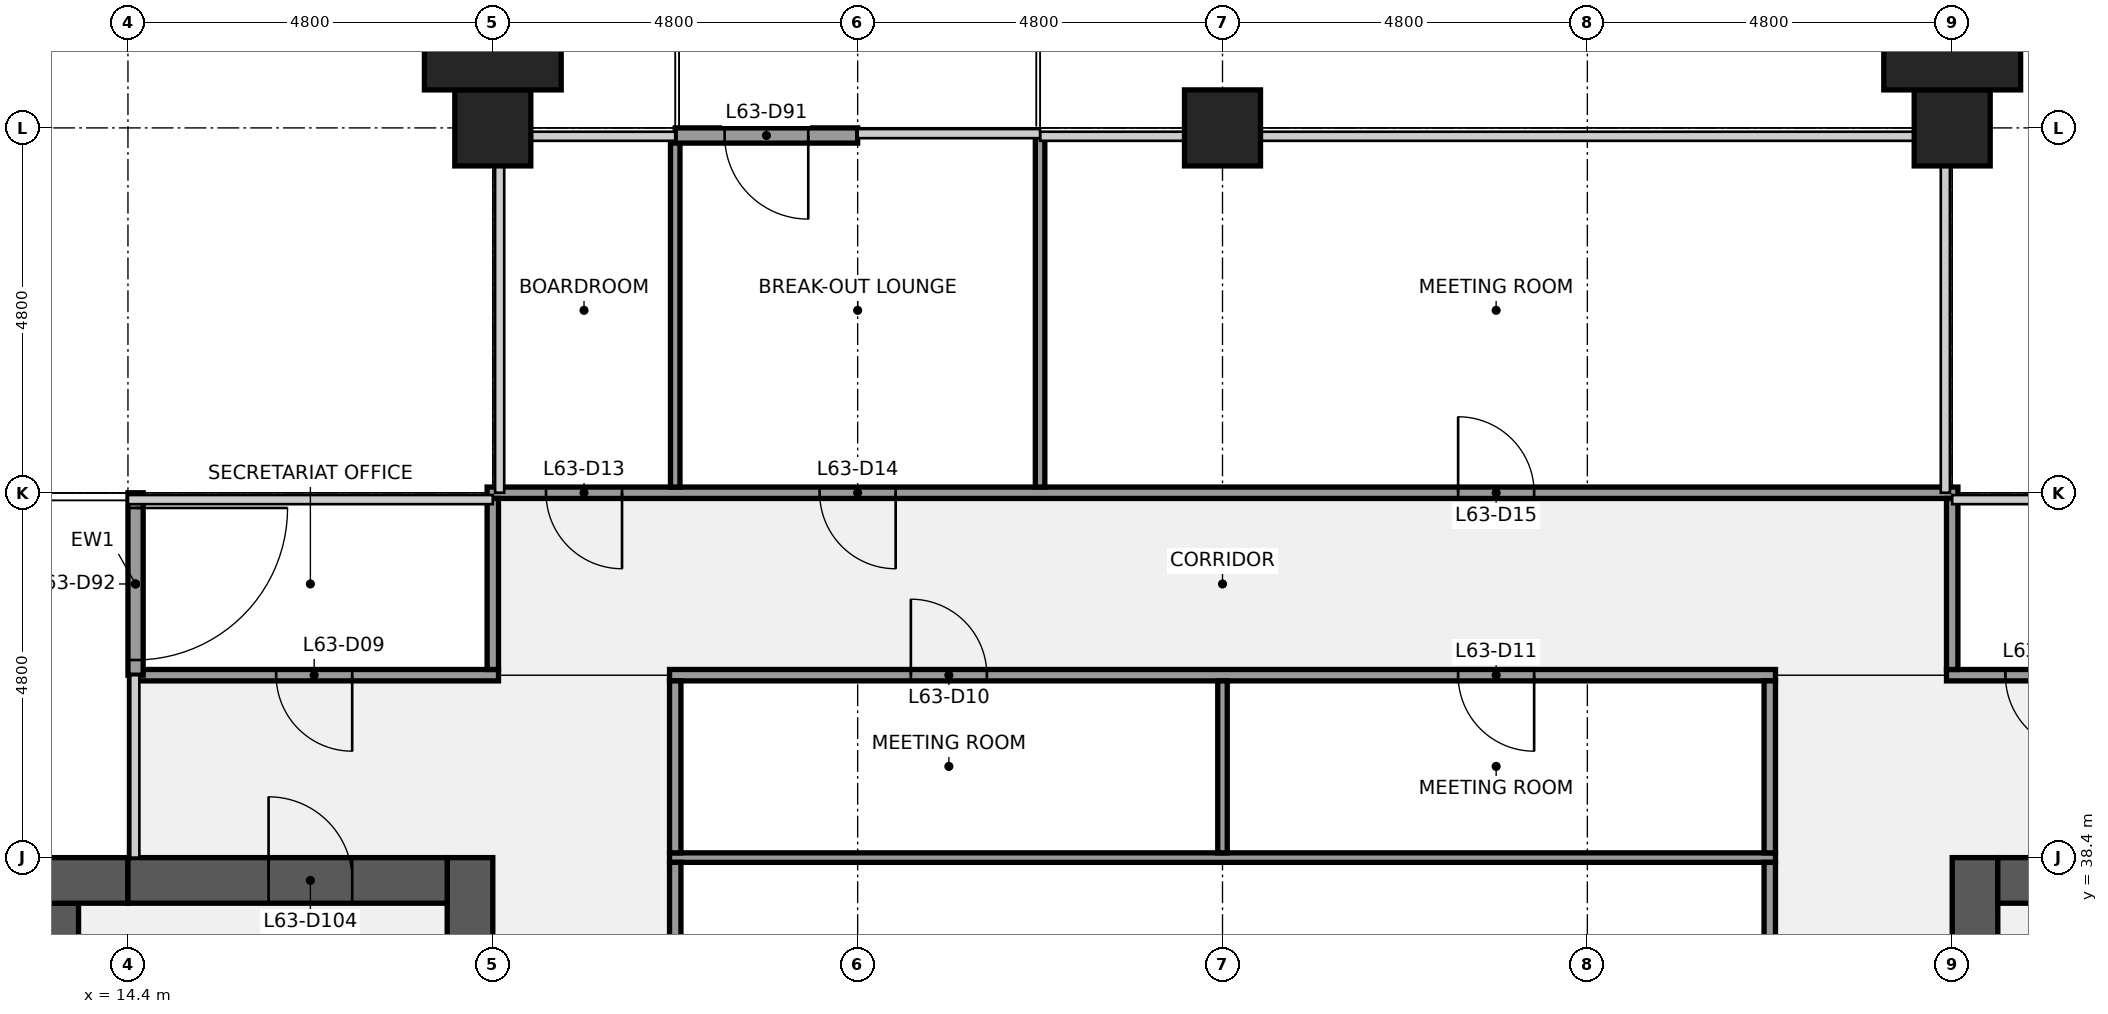
"""IFC4 building model, lengths in metres.
Left out: names, types, materials, properties, quantities, classifications, styles, units other than length and angle.
Written with IfcOpenShell. Run it as: python <this file> out.ifc"""

import sys

from ifc_helpers import new_model, si_unit, direction, frame, frame_2d, origin, origin_2d, place, context, subcontext, project, spatial, rectangle, extrude, element, fill, save


model = new_model("IFC4")
c1 = context("Model", 3, precision=1e-05, world=origin(), true_north=direction((0.0, 1.0)))
c2 = subcontext(c1, "Body", "Model", "MODEL_VIEW")
j1 = project(units=[si_unit("LENGTHUNIT", "METRE"), si_unit("PLANEANGLEUNIT", "RADIAN")], contexts=[c1])
p1 = place(None, origin())
s1 = spatial("IfcSite", under=j1, at=p1, CompositionType="ELEMENT")
p2 = place(p1, origin())
s2 = spatial("IfcBuilding", under=s1, at=p2, CompositionType="ELEMENT")
p3 = place(p2, frame((0.0, 0.0, 290.3)))
s3 = spatial("IfcBuildingStorey", under=s2, at=p3, CompositionType="ELEMENT", Elevation=290.3)
for number, where, z_axis, x_axis in (
    (1, (19.2, 48.0, 0.0), (0.0, 0.0, 1.0), (1.0, 0.0, 0.0)),
    (2, (28.8, 48.0, 0.0), (0.0, 0.0, 1.0), (1.0, 0.0, 0.0)),
    (3, (38.4, 48.0, 0.0), (0.0, 0.0, 1.0), (1.0, 0.0, 0.0)),
):
    element("IfcColumn", number, at=place(p3, frame(where, z_axis=z_axis, x_axis=x_axis)), inside=s3, PredefinedType="COLUMN", context=c2, shape_type="SweptSolid", body=[
        extrude(rectangle(XDim=1.0, YDim=1.0, at=origin_2d()), origin(), (0.0, 0.0, 1.0), 4.0),
    ])
p4 = place(p3, frame((18.9, 38.4, 0.0), z_axis=(0.0, 0.0, 1.0), x_axis=(0.0, -1.0, 0.0)))
e4 = element("IfcWall", 4, at=p4, inside=s3, PredefinedType="SHEAR", context=c2, shape_type="SweptSolid", body=[
    extrude(rectangle(XDim=28.8, YDim=0.6, at=frame_2d((14.4, 0.0))), origin(), (0.0, 0.0, 1.0), 3.84),
])
p5 = place(p4, frame((18.3, 0.0, 0.0)))
e5 = element("IfcOpeningElement", 5, at=p5, cuts=e4, PredefinedType="OPENING", context=c2, shape_type="SweptSolid", body=[
    extrude(rectangle(XDim=1.8, YDim=2.1, at=frame_2d((0.9, 1.05))), frame((0.0, 0.31, 0.0), z_axis=(0.0, -1.0, 0.0), x_axis=(1.0, 0.0, 0.0)), (0.0, 0.0, 1.0), 0.62),
])
p6 = place(p4, frame((8.7, 0.0, 0.0)))
e6 = element("IfcOpeningElement", 6, at=p6, cuts=e4, PredefinedType="OPENING", context=c2, shape_type="SweptSolid", body=[
    extrude(rectangle(XDim=1.8, YDim=2.1, at=frame_2d((0.9, 1.05))), frame((0.0, 0.31, 0.0), z_axis=(0.0, -1.0, 0.0), x_axis=(1.0, 0.0, 0.0)), (0.0, 0.0, 1.0), 0.62),
])
p7 = place(p3, frame((6.25, 37.5, 0.0), z_axis=(0.0, 0.0, 1.0), x_axis=(1.0, 0.0, 0.0)))
e7 = element("IfcWall", 7, at=p7, inside=s3, PredefinedType="SHEAR", context=c2, shape_type="SweptSolid", body=[
    extrude(rectangle(XDim=7.5, YDim=0.6, at=frame_2d((3.75, 0.0))), origin(), (0.0, 0.0, 1.0), 3.84),
])
p8 = place(p3, frame((0.6, 38.1, 0.0), z_axis=(0.0, 0.0, 1.0), x_axis=(1.0, 0.0, 0.0)))
e8 = element("IfcWall", 8, at=p8, inside=s3, PredefinedType="SHEAR", context=c2, shape_type="SweptSolid", body=[
    extrude(rectangle(XDim=13.8, YDim=0.6, at=frame_2d((6.9, 0.0))), origin(), (0.0, 0.0, 1.0), 3.84),
])
p9 = place(p8, frame((5.7, 0.0, 0.9)))
e9 = element("IfcOpeningElement", 9, at=p9, cuts=e8, PredefinedType="OPENING", context=c2, shape_type="SweptSolid", body=[
    extrude(rectangle(XDim=1.8, YDim=1.5, at=frame_2d((0.9, 0.75))), frame((0.0, 0.31, 0.0), z_axis=(0.0, -1.0, 0.0), x_axis=(1.0, 0.0, 0.0)), (0.0, 0.0, 1.0), 0.62),
])
p10 = place(p8, frame((10.5, 0.0, 0.9)))
e10 = element("IfcOpeningElement", 10, at=p10, cuts=e8, PredefinedType="OPENING", context=c2, shape_type="SweptSolid", body=[
    extrude(rectangle(XDim=1.8, YDim=1.5, at=frame_2d((0.9, 0.75))), frame((0.0, 0.31, 0.0), z_axis=(0.0, -1.0, 0.0), x_axis=(1.0, 0.0, 0.0)), (0.0, 0.0, 1.0), 0.62),
])
p11 = place(p3, frame((14.4, 38.1, 0.0), z_axis=(0.0, 0.0, 1.0), x_axis=(1.0, 0.0, 0.0)))
e11 = element("IfcWall", 11, at=p11, inside=s3, PredefinedType="SHEAR", context=c2, shape_type="SweptSolid", body=[
    extrude(rectangle(XDim=4.2, YDim=0.6, at=frame_2d((2.1, 0.0))), origin(), (0.0, 0.0, 1.0), 3.84),
])
p12 = place(p11, frame((1.85, 0.0, 0.0)))
e12 = element("IfcOpeningElement", 12, at=p12, cuts=e11, PredefinedType="OPENING", context=c2, shape_type="SweptSolid", body=[
    extrude(rectangle(XDim=1.1, YDim=2.1, at=frame_2d((0.55, 1.05))), frame((0.0, 0.31, 0.0), z_axis=(0.0, -1.0, 0.0), x_axis=(1.0, 0.0, 0.0)), (0.0, 0.0, 1.0), 0.62),
])
p13 = place(p3, frame((38.7, 9.6, 0.0), z_axis=(0.0, 0.0, 1.0), x_axis=(0.0, 1.0, 0.0)))
e13 = element("IfcWall", 13, at=p13, inside=s3, PredefinedType="SHEAR", context=c2, shape_type="SweptSolid", body=[
    extrude(rectangle(XDim=28.8, YDim=0.6, at=frame_2d((14.4, 0.0))), origin(), (0.0, 0.0, 1.0), 3.84),
])
p14 = place(p13, frame((8.7, 0.0, 0.0)))
e14 = element("IfcOpeningElement", 14, at=p14, cuts=e13, PredefinedType="OPENING", context=c2, shape_type="SweptSolid", body=[
    extrude(rectangle(XDim=1.8, YDim=2.1, at=frame_2d((0.9, 1.05))), frame((0.0, 0.31, 0.0), z_axis=(0.0, -1.0, 0.0), x_axis=(1.0, 0.0, 0.0)), (0.0, 0.0, 1.0), 0.62),
])
p15 = place(p13, frame((18.3, 0.0, 0.0)))
e15 = element("IfcOpeningElement", 15, at=p15, cuts=e13, PredefinedType="OPENING", context=c2, shape_type="SweptSolid", body=[
    extrude(rectangle(XDim=1.8, YDim=2.1, at=frame_2d((0.9, 1.05))), frame((0.0, 0.31, 0.0), z_axis=(0.0, -1.0, 0.0), x_axis=(1.0, 0.0, 0.0)), (0.0, 0.0, 1.0), 0.62),
])
p16 = place(p3, frame((39.0, 38.1, 0.0), z_axis=(0.0, 0.0, 1.0), x_axis=(1.0, 0.0, 0.0)))
e16 = element("IfcWall", 16, at=p16, inside=s3, PredefinedType="SHEAR", context=c2, shape_type="SweptSolid", body=[
    extrude(rectangle(XDim=4.2, YDim=0.6, at=frame_2d((2.1, 0.0))), origin(), (0.0, 0.0, 1.0), 3.84),
])
p17 = place(p16, frame((1.25, 0.0, 0.0)))
e17 = element("IfcOpeningElement", 17, at=p17, cuts=e16, PredefinedType="OPENING", context=c2, shape_type="SweptSolid", body=[
    extrude(rectangle(XDim=1.1, YDim=2.1, at=frame_2d((0.55, 1.05))), frame((0.0, 0.31, 0.0), z_axis=(0.0, -1.0, 0.0), x_axis=(1.0, 0.0, 0.0)), (0.0, 0.0, 1.0), 0.62),
])
p18 = place(p3, frame((21.525, 38.4, 0.0), z_axis=(0.0, 0.0, 1.0), x_axis=(1.0, 0.0, 0.0)))
e18 = element("IfcWall", 18, at=p18, inside=s3, PredefinedType="PARTITIONING", context=c2, shape_type="SweptSolid", body=[
    extrude(rectangle(XDim=14.55, YDim=0.125, at=frame_2d((7.275, 0.0))), origin(), (0.0, 0.0, 1.0), 2.87),
])
p19 = place(p3, frame((14.5, 40.8, 0.0), z_axis=(0.0, 0.0, 1.0), x_axis=(1.0, 0.0, 0.0)))
e19 = element("IfcWall", 19, at=p19, inside=s3, PredefinedType="PARTITIONING", context=c2, shape_type="SweptSolid", body=[
    extrude(rectangle(XDim=4.775, YDim=0.15, at=frame_2d((2.387, 0.0))), origin(), (0.0, 0.0, 1.0), 2.87),
])
p20 = place(p19, frame((1.85, 0.0, 0.0)))
e20 = element("IfcOpeningElement", 20, at=p20, cuts=e19, PredefinedType="OPENING", context=c2, shape_type="SweptSolid", body=[
    extrude(rectangle(XDim=1.0, YDim=2.1, at=frame_2d((0.5, 1.05))), frame((0.0, 0.085, 0.0), z_axis=(0.0, -1.0, 0.0), x_axis=(1.0, 0.0, 0.0)), (0.0, 0.0, 1.0), 0.17),
])
p21 = place(p3, frame((21.525, 40.8, 0.0), z_axis=(0.0, 0.0, 1.0), x_axis=(1.0, 0.0, 0.0)))
e21 = element("IfcWall", 21, at=p21, inside=s3, PredefinedType="PARTITIONING", context=c2, shape_type="SweptSolid", body=[
    extrude(rectangle(XDim=14.55, YDim=0.15, at=frame_2d((7.275, 0.0))), origin(), (0.0, 0.0, 1.0), 2.87),
])
p22 = place(p21, frame((3.175, 0.0, 0.0)))
e22 = element("IfcOpeningElement", 22, at=p22, cuts=e21, PredefinedType="OPENING", context=c2, shape_type="SweptSolid", body=[
    extrude(rectangle(XDim=1.0, YDim=2.1, at=frame_2d((0.5, 1.05))), frame((0.0, 0.085, 0.0), z_axis=(0.0, -1.0, 0.0), x_axis=(1.0, 0.0, 0.0)), (0.0, 0.0, 1.0), 0.17),
])
p23 = place(p21, frame((10.375, 0.0, 0.0)))
e23 = element("IfcOpeningElement", 23, at=p23, cuts=e21, PredefinedType="OPENING", context=c2, shape_type="SweptSolid", body=[
    extrude(rectangle(XDim=1.0, YDim=2.1, at=frame_2d((0.5, 1.05))), frame((0.0, 0.085, 0.0), z_axis=(0.0, -1.0, 0.0), x_axis=(1.0, 0.0, 0.0)), (0.0, 0.0, 1.0), 0.17),
])
p24 = place(p3, frame((38.325, 40.8, 0.0), z_axis=(0.0, 0.0, 1.0), x_axis=(1.0, 0.0, 0.0)))
e24 = element("IfcWall", 24, at=p24, inside=s3, PredefinedType="PARTITIONING", context=c2, shape_type="SweptSolid", body=[
    extrude(rectangle(XDim=4.775, YDim=0.15, at=frame_2d((2.388, 0.0))), origin(), (0.0, 0.0, 1.0), 2.87),
])
p25 = place(p24, frame((0.775, 0.0, 0.0)))
e25 = element("IfcOpeningElement", 25, at=p25, cuts=e24, PredefinedType="OPENING", context=c2, shape_type="SweptSolid", body=[
    extrude(rectangle(XDim=1.0, YDim=2.1, at=frame_2d((0.5, 1.05))), frame((0.0, 0.085, 0.0), z_axis=(0.0, -1.0, 0.0), x_axis=(1.0, 0.0, 0.0)), (0.0, 0.0, 1.0), 0.17),
])
p26 = place(p3, frame((19.125, 43.2, 0.0), z_axis=(0.0, 0.0, 1.0), x_axis=(1.0, 0.0, 0.0)))
e26 = element("IfcWall", 26, at=p26, inside=s3, PredefinedType="PARTITIONING", context=c2, shape_type="SweptSolid", body=[
    extrude(rectangle(XDim=19.35, YDim=0.15, at=frame_2d((9.675, 0.0))), origin(), (0.0, 0.0, 1.0), 2.87),
])
p27 = place(p26, frame((0.775, 0.0, 0.0)))
e27 = element("IfcOpeningElement", 27, at=p27, cuts=e26, PredefinedType="OPENING", context=c2, shape_type="SweptSolid", body=[
    extrude(rectangle(XDim=1.0, YDim=2.1, at=frame_2d((0.5, 1.05))), frame((0.0, 0.085, 0.0), z_axis=(0.0, -1.0, 0.0), x_axis=(1.0, 0.0, 0.0)), (0.0, 0.0, 1.0), 0.17),
])
p28 = place(p26, frame((4.375, 0.0, 0.0)))
e28 = element("IfcOpeningElement", 28, at=p28, cuts=e26, PredefinedType="OPENING", context=c2, shape_type="SweptSolid", body=[
    extrude(rectangle(XDim=1.0, YDim=2.1, at=frame_2d((0.5, 1.05))), frame((0.0, 0.085, 0.0), z_axis=(0.0, -1.0, 0.0), x_axis=(1.0, 0.0, 0.0)), (0.0, 0.0, 1.0), 0.17),
])
p29 = place(p26, frame((12.775, 0.0, 0.0)))
e29 = element("IfcOpeningElement", 29, at=p29, cuts=e26, PredefinedType="OPENING", context=c2, shape_type="SweptSolid", body=[
    extrude(rectangle(XDim=1.0, YDim=2.1, at=frame_2d((0.5, 1.05))), frame((0.0, 0.085, 0.0), z_axis=(0.0, -1.0, 0.0), x_axis=(1.0, 0.0, 0.0)), (0.0, 0.0, 1.0), 0.17),
])
p30 = place(p3, frame((19.2, 40.875, 0.0), z_axis=(0.0, 0.0, 1.0), x_axis=(0.0, 1.0, 0.0)))
e30 = element("IfcWall", 30, at=p30, inside=s3, PredefinedType="PARTITIONING", context=c2, shape_type="SweptSolid", body=[
    extrude(rectangle(XDim=2.25, YDim=0.15, at=frame_2d((1.125, 0.0))), origin(), (0.0, 0.0, 1.0), 2.87),
])
p31 = place(p3, frame((21.6, 43.275, 0.0), z_axis=(0.0, 0.0, 1.0), x_axis=(0.0, 1.0, 0.0)))
e31 = element("IfcWall", 31, at=p31, inside=s3, PredefinedType="PARTITIONING", context=c2, shape_type="SweptSolid", body=[
    extrude(rectangle(XDim=4.625, YDim=0.125, at=frame_2d((2.312, 0.0))), origin(), (0.0, 0.0, 1.0), 2.87),
])
p32 = place(p3, frame((21.6, 28.863, 0.0), z_axis=(0.0, 0.0, 1.0), x_axis=(0.0, 1.0, 0.0)))
e32 = element("IfcWall", 32, at=p32, inside=s3, PredefinedType="PARTITIONING", context=c2, shape_type="SweptSolid", body=[
    extrude(rectangle(XDim=9.475, YDim=0.15, at=frame_2d((4.737, 0.0))), origin(), (0.0, 0.0, 1.0), 2.87),
])
p33 = place(p32, frame((4.238, 0.0, 0.0)))
e33 = element("IfcOpeningElement", 33, at=p33, cuts=e32, PredefinedType="OPENING", context=c2, shape_type="SweptSolid", body=[
    extrude(rectangle(XDim=1.0, YDim=2.1, at=frame_2d((0.5, 1.05))), frame((0.0, 0.085, 0.0), z_axis=(0.0, -1.0, 0.0), x_axis=(1.0, 0.0, 0.0)), (0.0, 0.0, 1.0), 0.17),
])
p34 = place(p3, frame((21.6, 38.462, 0.0), z_axis=(0.0, 0.0, 1.0), x_axis=(0.0, 1.0, 0.0)))
e34 = element("IfcWall", 34, at=p34, inside=s3, PredefinedType="PARTITIONING", context=c2, shape_type="SweptSolid", body=[
    extrude(rectangle(XDim=2.263, YDim=0.15, at=frame_2d((1.131, 0.0))), origin(), (0.0, 0.0, 1.0), 2.87),
])
p35 = place(p3, frame((26.4, 43.275, 0.0), z_axis=(0.0, 0.0, 1.0), x_axis=(0.0, 1.0, 0.0)))
e35 = element("IfcWall", 35, at=p35, inside=s3, PredefinedType="PARTITIONING", context=c2, shape_type="SweptSolid", body=[
    extrude(rectangle(XDim=4.625, YDim=0.125, at=frame_2d((2.312, 0.0))), origin(), (0.0, 0.0, 1.0), 2.87),
])
p36 = place(p3, frame((28.8, 38.462, 0.0), z_axis=(0.0, 0.0, 1.0), x_axis=(0.0, 1.0, 0.0)))
e36 = element("IfcWall", 36, at=p36, inside=s3, PredefinedType="PARTITIONING", context=c2, shape_type="SweptSolid", body=[
    extrude(rectangle(XDim=2.263, YDim=0.125, at=frame_2d((1.131, 0.0))), origin(), (0.0, 0.0, 1.0), 2.87),
])
p37 = place(p3, frame((36.0, 28.863, 0.0), z_axis=(0.0, 0.0, 1.0), x_axis=(0.0, 1.0, 0.0)))
e37 = element("IfcWall", 37, at=p37, inside=s3, PredefinedType="PARTITIONING", context=c2, shape_type="SweptSolid", body=[
    extrude(rectangle(XDim=9.475, YDim=0.15, at=frame_2d((4.737, 0.0))), origin(), (0.0, 0.0, 1.0), 2.87),
])
p38 = place(p3, frame((36.0, 38.462, 0.0), z_axis=(0.0, 0.0, 1.0), x_axis=(0.0, 1.0, 0.0)))
e38 = element("IfcWall", 38, at=p38, inside=s3, PredefinedType="PARTITIONING", context=c2, shape_type="SweptSolid", body=[
    extrude(rectangle(XDim=2.263, YDim=0.15, at=frame_2d((1.131, 0.0))), origin(), (0.0, 0.0, 1.0), 2.87),
])
p39 = place(p3, frame((38.4, 40.875, 0.0), z_axis=(0.0, 0.0, 1.0), x_axis=(0.0, 1.0, 0.0)))
e39 = element("IfcWall", 39, at=p39, inside=s3, PredefinedType="PARTITIONING", context=c2, shape_type="SweptSolid", body=[
    extrude(rectangle(XDim=2.25, YDim=0.15, at=frame_2d((1.125, 0.0))), origin(), (0.0, 0.0, 1.0), 2.87),
])
p40 = place(p3, frame((24.0, 47.9, 0.0), z_axis=(0.0, 0.0, 1.0), x_axis=(-1.0, 0.0, 0.0)))
e40 = element("IfcWall", 40, at=p40, inside=s3, PredefinedType="SOLIDWALL", context=c2, shape_type="SweptSolid", body=[
    extrude(rectangle(XDim=2.4, YDim=0.2, at=frame_2d((1.2, 0.0))), origin(), (0.0, 0.0, 1.0), 3.314),
])
p41 = place(p40, frame((0.65, 0.0, 0.0)))
e41 = element("IfcOpeningElement", 41, at=p41, cuts=e40, PredefinedType="OPENING", context=c2, shape_type="SweptSolid", body=[
    extrude(rectangle(XDim=1.1, YDim=2.1, at=frame_2d((0.55, 1.05))), frame((0.0, 0.11, 0.0), z_axis=(0.0, -1.0, 0.0), x_axis=(1.0, 0.0, 0.0)), (0.0, 0.0, 1.0), 0.22),
])
p42 = place(p3, frame((14.5, 43.2, 0.0), z_axis=(0.0, 0.0, 1.0), x_axis=(0.0, -1.0, 0.0)))
e42 = element("IfcWall", 42, at=p42, inside=s3, PredefinedType="SOLIDWALL", context=c2, shape_type="SweptSolid", body=[
    extrude(rectangle(XDim=2.4, YDim=0.2, at=frame_2d((1.2, 0.0))), origin(), (0.0, 0.0, 1.0), 3.238),
])
p43 = place(p42, frame((0.2, 0.0, 0.0)))
e43 = element("IfcOpeningElement", 43, at=p43, cuts=e42, PredefinedType="OPENING", context=c2, shape_type="SweptSolid", body=[
    extrude(rectangle(XDim=2.0, YDim=2.1, at=frame_2d((1.0, 1.05))), frame((0.0, 0.11, 0.0), z_axis=(0.0, -1.0, 0.0), x_axis=(1.0, 0.0, 0.0)), (0.0, 0.0, 1.0), 0.22),
])
for number, where, z_axis, x_axis in (
    (44, (19.2, 49.0, 0.0), (0.0, 0.0, 1.0), (1.0, 0.0, 0.0)),
    (45, (38.4, 49.0, 0.0), (0.0, 0.0, 1.0), (1.0, 0.0, 0.0)),
):
    element("IfcColumn", number, at=place(p3, frame(where, z_axis=z_axis, x_axis=x_axis)), inside=s3, PredefinedType="PILASTER", context=c2, shape_type="SweptSolid", body=[
        extrude(rectangle(XDim=1.8, YDim=1.0, at=origin_2d()), origin(), (0.0, 0.0, 1.0), 4.0),
    ])
p44 = place(p12, origin())
e46 = element("IfcDoor", 46, at=p44, inside=s3, OperationType="SINGLE_SWING_LEFT", PredefinedType="DOOR", context=c2, shape_type="SweptSolid", body=[
    extrude(rectangle(XDim=1.1, YDim=2.1, at=frame_2d((0.55, 1.05))), frame((0.0, 0.025, 0.0), z_axis=(0.0, -1.0, 0.0), x_axis=(1.0, 0.0, 0.0)), (0.0, 0.0, 1.0), 0.05),
])
fill(e12, e46)
p45 = place(p20, origin())
e47 = element("IfcDoor", 47, at=p45, inside=s3, OperationType="SINGLE_SWING_RIGHT", PredefinedType="DOOR", context=c2, shape_type="SweptSolid", body=[
    extrude(rectangle(XDim=1.0, YDim=2.1, at=frame_2d((0.5, 1.05))), frame((0.0, 0.025, 0.0), z_axis=(0.0, -1.0, 0.0), x_axis=(1.0, 0.0, 0.0)), (0.0, 0.0, 1.0), 0.05),
])
fill(e20, e47)
p46 = place(p22, origin())
e48 = element("IfcDoor", 48, at=p46, inside=s3, OperationType="SINGLE_SWING_LEFT", PredefinedType="DOOR", context=c2, shape_type="SweptSolid", body=[
    extrude(rectangle(XDim=1.0, YDim=2.1, at=frame_2d((0.5, 1.05))), frame((0.0, 0.025, 0.0), z_axis=(0.0, -1.0, 0.0), x_axis=(1.0, 0.0, 0.0)), (0.0, 0.0, 1.0), 0.05),
])
fill(e22, e48)
p47 = place(p23, origin())
e49 = element("IfcDoor", 49, at=p47, inside=s3, OperationType="SINGLE_SWING_RIGHT", PredefinedType="DOOR", context=c2, shape_type="SweptSolid", body=[
    extrude(rectangle(XDim=1.0, YDim=2.1, at=frame_2d((0.5, 1.05))), frame((0.0, 0.025, 0.0), z_axis=(0.0, -1.0, 0.0), x_axis=(1.0, 0.0, 0.0)), (0.0, 0.0, 1.0), 0.05),
])
fill(e23, e49)
p48 = place(p25, origin())
e50 = element("IfcDoor", 50, at=p48, inside=s3, OperationType="SINGLE_SWING_RIGHT", PredefinedType="DOOR", context=c2, shape_type="SweptSolid", body=[
    extrude(rectangle(XDim=1.0, YDim=2.1, at=frame_2d((0.5, 1.05))), frame((0.0, 0.025, 0.0), z_axis=(0.0, -1.0, 0.0), x_axis=(1.0, 0.0, 0.0)), (0.0, 0.0, 1.0), 0.05),
])
fill(e25, e50)
p49 = place(p27, origin())
e51 = element("IfcDoor", 51, at=p49, inside=s3, OperationType="SINGLE_SWING_RIGHT", PredefinedType="DOOR", context=c2, shape_type="SweptSolid", body=[
    extrude(rectangle(XDim=1.0, YDim=2.1, at=frame_2d((0.5, 1.05))), frame((0.0, 0.025, 0.0), z_axis=(0.0, -1.0, 0.0), x_axis=(1.0, 0.0, 0.0)), (0.0, 0.0, 1.0), 0.05),
])
fill(e27, e51)
p50 = place(p28, origin())
e52 = element("IfcDoor", 52, at=p50, inside=s3, OperationType="SINGLE_SWING_RIGHT", PredefinedType="DOOR", context=c2, shape_type="SweptSolid", body=[
    extrude(rectangle(XDim=1.0, YDim=2.1, at=frame_2d((0.5, 1.05))), frame((0.0, 0.025, 0.0), z_axis=(0.0, -1.0, 0.0), x_axis=(1.0, 0.0, 0.0)), (0.0, 0.0, 1.0), 0.05),
])
fill(e28, e52)
p51 = place(p29, origin())
e53 = element("IfcDoor", 53, at=p51, inside=s3, OperationType="SINGLE_SWING_LEFT", PredefinedType="DOOR", context=c2, shape_type="SweptSolid", body=[
    extrude(rectangle(XDim=1.0, YDim=2.1, at=frame_2d((0.5, 1.05))), frame((0.0, 0.025, 0.0), z_axis=(0.0, -1.0, 0.0), x_axis=(1.0, 0.0, 0.0)), (0.0, 0.0, 1.0), 0.05),
])
fill(e29, e53)
p52 = place(p41, origin())
e54 = element("IfcDoor", 54, at=p52, inside=s3, OperationType="SINGLE_SWING_LEFT", PredefinedType="DOOR", context=c2, shape_type="SweptSolid", body=[
    extrude(rectangle(XDim=1.1, YDim=2.1, at=frame_2d((0.55, 1.05))), frame((0.0, 0.025, 0.0), z_axis=(0.0, -1.0, 0.0), x_axis=(1.0, 0.0, 0.0)), (0.0, 0.0, 1.0), 0.05),
])
fill(e41, e54)
p53 = place(p43, origin())
e55 = element("IfcDoor", 55, at=p53, inside=s3, OperationType="SINGLE_SWING_LEFT", PredefinedType="DOOR", context=c2, shape_type="SweptSolid", body=[
    extrude(rectangle(XDim=2.0, YDim=2.1, at=frame_2d((1.0, 1.05))), frame((0.0, 0.025, 0.0), z_axis=(0.0, -1.0, 0.0), x_axis=(1.0, 0.0, 0.0)), (0.0, 0.0, 1.0), 0.05),
])
fill(e43, e55)
save(model, sys.argv[1])
